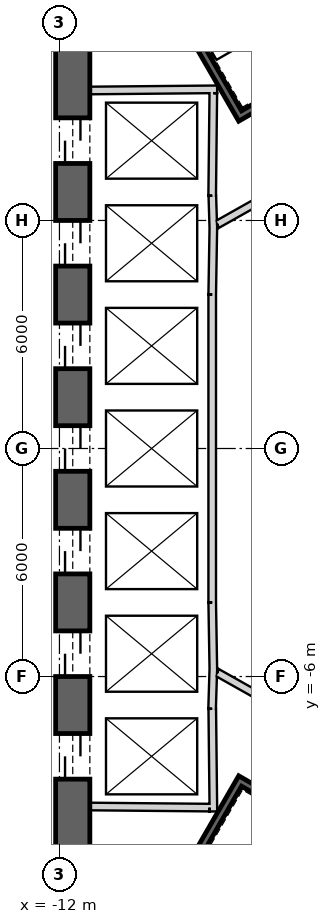
"""IFC4 building model, lengths in metres.
Left out: names, types, materials, properties, quantities, classifications, styles, units other than length and angle.
Written with IfcOpenShell. Run it as: python <this file> out.ifc"""

import sys

from ifc_helpers import new_model, si_unit, direction, frame, frame_2d, origin, place, context, subcontext, project, spatial, rectangle, extrude, element, fill, save


model = new_model("IFC4")
c1 = context("Model", 3, precision=1e-05, world=origin(), true_north=direction((0.0, 1.0)))
c2 = subcontext(c1, "Body", "Model", "MODEL_VIEW")
j1 = project(units=[si_unit("LENGTHUNIT", "METRE"), si_unit("PLANEANGLEUNIT", "RADIAN")], contexts=[c1])
p1 = place(None, origin())
s1 = spatial("IfcSite", under=j1, at=p1, CompositionType="ELEMENT")
p2 = place(p1, origin())
s2 = spatial("IfcBuilding", under=s1, at=p2, CompositionType="ELEMENT")
p3 = place(p2, frame((0.0, 0.0, 368.9)))
s3 = spatial("IfcBuildingStorey", under=s2, at=p3, CompositionType="ELEMENT", Elevation=368.9)
p4 = place(p3, frame((19.475, 2.208, 0.0), z_axis=(0.0, 0.0, 1.0), x_axis=(-0.866028369851, 0.499994862586, 0.0)))
e1 = element("IfcWall", 1, at=p4, inside=s3, PredefinedType="SHEAR", context=c2, shape_type="SweptSolid", body=[
    extrude(rectangle(XDim=31.523, YDim=0.9, at=frame_2d((15.762, 0.0))), origin(), (0.0, 0.0, 1.0), 3.9),
])
p5 = place(p4, frame((7.062, 0.0, 0.0)))
e2 = element("IfcOpeningElement", 2, at=p5, cuts=e1, PredefinedType="OPENING", context=c2, shape_type="SweptSolid", body=[
    extrude(rectangle(XDim=1.2, YDim=2.4, at=frame_2d((0.6, 1.2))), frame((0.0, 0.46, 0.0), z_axis=(0.0, -1.0, 0.0), x_axis=(1.0, 0.0, 0.0)), (0.0, 0.0, 1.0), 0.92),
])
p6 = place(p4, frame((3.612, 0.0, 0.0)))
e3 = element("IfcOpeningElement", 3, at=p6, cuts=e1, PredefinedType="OPENING", context=c2, shape_type="SweptSolid", body=[
    extrude(rectangle(XDim=1.2, YDim=2.4, at=frame_2d((0.6, 1.2))), frame((0.0, 0.46, 0.0), z_axis=(0.0, -1.0, 0.0), x_axis=(1.0, 0.0, 0.0)), (0.0, 0.0, 1.0), 0.92),
])
p7 = place(p4, frame((26.712, 0.0, 0.0)))
e4 = element("IfcOpeningElement", 4, at=p7, cuts=e1, PredefinedType="OPENING", context=c2, shape_type="SweptSolid", body=[
    extrude(rectangle(XDim=1.2, YDim=2.4, at=frame_2d((0.6, 1.2))), frame((0.0, 0.46, 0.0), z_axis=(0.0, -1.0, 0.0), x_axis=(1.0, 0.0, 0.0)), (0.0, 0.0, 1.0), 0.92),
])
p8 = place(p3, frame((-11.65, 15.762, 0.0), z_axis=(0.0, 0.0, 1.0), x_axis=(0.0, -1.0, 0.0)))
e5 = element("IfcWall", 5, at=p8, inside=s3, PredefinedType="SHEAR", context=c2, shape_type="SweptSolid", body=[
    extrude(rectangle(XDim=31.523, YDim=0.9, at=frame_2d((15.762, 0.0))), origin(), (0.0, 0.0, 1.0), 3.9),
])
p9 = place(p8, frame((7.062, 0.0, 0.0)))
e6 = element("IfcOpeningElement", 6, at=p9, cuts=e5, PredefinedType="OPENING", context=c2, shape_type="SweptSolid", body=[
    extrude(rectangle(XDim=1.2, YDim=2.4, at=frame_2d((0.6, 1.2))), frame((0.0, 0.46, 0.0), z_axis=(0.0, -1.0, 0.0), x_axis=(1.0, 0.0, 0.0)), (0.0, 0.0, 1.0), 0.92),
])
p10 = place(p8, frame((9.762, 0.0, 0.0)))
e7 = element("IfcOpeningElement", 7, at=p10, cuts=e5, PredefinedType="OPENING", context=c2, shape_type="SweptSolid", body=[
    extrude(rectangle(XDim=1.2, YDim=2.4, at=frame_2d((0.6, 1.2))), frame((0.0, 0.46, 0.0), z_axis=(0.0, -1.0, 0.0), x_axis=(1.0, 0.0, 0.0)), (0.0, 0.0, 1.0), 0.92),
])
p11 = place(p8, frame((12.462, 0.0, 0.0)))
e8 = element("IfcOpeningElement", 8, at=p11, cuts=e5, PredefinedType="OPENING", context=c2, shape_type="SweptSolid", body=[
    extrude(rectangle(XDim=1.2, YDim=2.4, at=frame_2d((0.6, 1.2))), frame((0.0, 0.46, 0.0), z_axis=(0.0, -1.0, 0.0), x_axis=(1.0, 0.0, 0.0)), (0.0, 0.0, 1.0), 0.92),
])
p12 = place(p8, frame((15.162, 0.0, 0.0)))
e9 = element("IfcOpeningElement", 9, at=p12, cuts=e5, PredefinedType="OPENING", context=c2, shape_type="SweptSolid", body=[
    extrude(rectangle(XDim=1.2, YDim=2.4, at=frame_2d((0.6, 1.2))), frame((0.0, 0.46, 0.0), z_axis=(0.0, -1.0, 0.0), x_axis=(1.0, 0.0, 0.0)), (0.0, 0.0, 1.0), 0.92),
])
p13 = place(p8, frame((17.862, 0.0, 0.0)))
e10 = element("IfcOpeningElement", 10, at=p13, cuts=e5, PredefinedType="OPENING", context=c2, shape_type="SweptSolid", body=[
    extrude(rectangle(XDim=1.2, YDim=2.4, at=frame_2d((0.6, 1.2))), frame((0.0, 0.46, 0.0), z_axis=(0.0, -1.0, 0.0), x_axis=(1.0, 0.0, 0.0)), (0.0, 0.0, 1.0), 0.92),
])
p14 = place(p8, frame((20.562, 0.0, 0.0)))
e11 = element("IfcOpeningElement", 11, at=p14, cuts=e5, PredefinedType="OPENING", context=c2, shape_type="SweptSolid", body=[
    extrude(rectangle(XDim=1.2, YDim=2.4, at=frame_2d((0.6, 1.2))), frame((0.0, 0.46, 0.0), z_axis=(0.0, -1.0, 0.0), x_axis=(1.0, 0.0, 0.0)), (0.0, 0.0, 1.0), 0.92),
])
p15 = place(p8, frame((23.262, 0.0, 0.0)))
e12 = element("IfcOpeningElement", 12, at=p15, cuts=e5, PredefinedType="OPENING", context=c2, shape_type="SweptSolid", body=[
    extrude(rectangle(XDim=1.2, YDim=2.4, at=frame_2d((0.6, 1.2))), frame((0.0, 0.46, 0.0), z_axis=(0.0, -1.0, 0.0), x_axis=(1.0, 0.0, 0.0)), (0.0, 0.0, 1.0), 0.92),
])
p16 = place(p8, frame((3.612, 0.0, 0.0)))
e13 = element("IfcOpeningElement", 13, at=p16, cuts=e5, PredefinedType="OPENING", context=c2, shape_type="SweptSolid", body=[
    extrude(rectangle(XDim=1.2, YDim=2.4, at=frame_2d((0.6, 1.2))), frame((0.0, 0.46, 0.0), z_axis=(0.0, -1.0, 0.0), x_axis=(1.0, 0.0, 0.0)), (0.0, 0.0, 1.0), 0.92),
])
p17 = place(p8, frame((26.712, 0.0, 0.0)))
e14 = element("IfcOpeningElement", 14, at=p17, cuts=e5, PredefinedType="OPENING", context=c2, shape_type="SweptSolid", body=[
    extrude(rectangle(XDim=1.2, YDim=2.4, at=frame_2d((0.6, 1.2))), frame((0.0, 0.46, 0.0), z_axis=(0.0, -1.0, 0.0), x_axis=(1.0, 0.0, 0.0)), (0.0, 0.0, 1.0), 0.92),
])
p18 = place(p3, frame((-7.825, -17.97, 0.0), z_axis=(0.0, 0.0, 1.0), x_axis=(0.866028369851, 0.499994862586, 0.0)))
e15 = element("IfcWall", 15, at=p18, inside=s3, PredefinedType="SHEAR", context=c2, shape_type="SweptSolid", body=[
    extrude(rectangle(XDim=31.523, YDim=0.9, at=frame_2d((15.762, 0.0))), origin(), (0.0, 0.0, 1.0), 3.9),
])
p19 = place(p18, frame((17.862, 0.0, 0.0)))
e16 = element("IfcOpeningElement", 16, at=p19, cuts=e15, PredefinedType="OPENING", context=c2, shape_type="SweptSolid", body=[
    extrude(rectangle(XDim=1.2, YDim=2.4, at=frame_2d((0.6, 1.2))), frame((0.0, 0.46, 0.0), z_axis=(0.0, -1.0, 0.0), x_axis=(1.0, 0.0, 0.0)), (0.0, 0.0, 1.0), 0.92),
])
p20 = place(p18, frame((20.562, 0.0, 0.0)))
e17 = element("IfcOpeningElement", 17, at=p20, cuts=e15, PredefinedType="OPENING", context=c2, shape_type="SweptSolid", body=[
    extrude(rectangle(XDim=1.2, YDim=2.4, at=frame_2d((0.6, 1.2))), frame((0.0, 0.46, 0.0), z_axis=(0.0, -1.0, 0.0), x_axis=(1.0, 0.0, 0.0)), (0.0, 0.0, 1.0), 0.92),
])
p21 = place(p18, frame((26.712, 0.0, 0.0)))
e18 = element("IfcOpeningElement", 18, at=p21, cuts=e15, PredefinedType="OPENING", context=c2, shape_type="SweptSolid", body=[
    extrude(rectangle(XDim=1.2, YDim=2.4, at=frame_2d((0.6, 1.2))), frame((0.0, 0.46, 0.0), z_axis=(0.0, -1.0, 0.0), x_axis=(1.0, 0.0, 0.0)), (0.0, 0.0, 1.0), 0.92),
])
p22 = place(p18, frame((3.612, 0.0, 0.0)))
e19 = element("IfcOpeningElement", 19, at=p22, cuts=e15, PredefinedType="OPENING", context=c2, shape_type="SweptSolid", body=[
    extrude(rectangle(XDim=1.2, YDim=2.4, at=frame_2d((0.6, 1.2))), frame((0.0, 0.46, 0.0), z_axis=(0.0, -1.0, 0.0), x_axis=(1.0, 0.0, 0.0)), (0.0, 0.0, 1.0), 0.92),
])
p23 = place(p3, frame((-11.2, 9.42, 0.0), z_axis=(0.0, 0.0, 1.0), x_axis=(0.999957167047, 0.009255488683, 0.0)))
e20 = element("IfcWall", 20, at=p23, inside=s3, PredefinedType="PLUMBINGWALL", context=c2, shape_type="SweptSolid", body=[
    extrude(rectangle(XDim=3.35, YDim=0.2, at=frame_2d((1.675, 0.0))), origin(), (0.0, 0.0, 1.0), 3.6),
])
p24 = place(p3, frame((-7.951, 9.35, 0.0), z_axis=(0.0, 0.0, 1.0), x_axis=(-0.011120469654, -0.999938165666, 0.0)))
e21 = element("IfcWall", 21, at=p24, inside=s3, PredefinedType="PLUMBINGWALL", context=c2, shape_type="SweptSolid", body=[
    extrude(rectangle(XDim=2.7, YDim=0.2, at=frame_2d((1.35, 0.0))), origin(), (0.0, 0.0, 1.0), 3.6),
])
p25 = place(p3, frame((-7.977, 6.65, 0.0), z_axis=(0.0, 0.0, 1.0), x_axis=(0.030861509705, -0.999523670164, 0.0)))
e22 = element("IfcWall", 22, at=p25, inside=s3, PredefinedType="PLUMBINGWALL", context=c2, shape_type="SweptSolid", body=[
    extrude(rectangle(XDim=0.878, YDim=0.2, at=frame_2d((0.439, 0.0))), origin(), (0.0, 0.0, 1.0), 3.6),
])
p26 = place(p3, frame((-7.949, 5.895, 0.0), z_axis=(0.0, 0.0, 1.0), x_axis=(-0.012042535896, -0.999927486035, 0.0)))
e23 = element("IfcWall", 23, at=p26, inside=s3, PredefinedType="PLUMBINGWALL", context=c2, shape_type="SweptSolid", body=[
    extrude(rectangle(XDim=1.845, YDim=0.2, at=frame_2d((0.922, 0.0))), origin(), (0.0, 0.0, 1.0), 3.6),
])
p27 = place(p3, frame((-7.98, 4.05, 0.0), z_axis=(0.0, 0.0, 1.0), x_axis=(0.0, -1.0, 0.0)))
e24 = element("IfcWall", 24, at=p27, inside=s3, PredefinedType="PLUMBINGWALL", context=c2, shape_type="SweptSolid", body=[
    extrude(rectangle(XDim=8.1, YDim=0.2, at=frame_2d((4.05, 0.0))), origin(), (0.0, 0.0, 1.0), 3.6),
])
p28 = place(p3, frame((-7.95, -5.772, 0.0), z_axis=(0.0, 0.0, 1.0), x_axis=(-0.030803413295, -0.999525462272, 0.0)))
e25 = element("IfcWall", 25, at=p28, inside=s3, PredefinedType="PLUMBINGWALL", context=c2, shape_type="SweptSolid", body=[
    extrude(rectangle(XDim=1.078, YDim=0.2, at=frame_2d((0.539, 0.0))), origin(), (0.0, 0.0, 1.0), 3.6),
])
p29 = place(p3, frame((-7.971, -4.05, 0.0), z_axis=(0.0, 0.0, 1.0), x_axis=(0.012042535896, -0.999927486035, 0.0)))
e26 = element("IfcWall", 26, at=p29, inside=s3, PredefinedType="PLUMBINGWALL", context=c2, shape_type="SweptSolid", body=[
    extrude(rectangle(XDim=1.845, YDim=0.2, at=frame_2d((0.922, 0.0))), origin(), (0.0, 0.0, 1.0), 3.6),
])
p30 = place(p3, frame((-7.979, -6.85, 0.0), z_axis=(0.0, 0.0, 1.0), x_axis=(0.011121475088, -0.999938154483, 0.0)))
e27 = element("IfcWall", 27, at=p30, inside=s3, PredefinedType="PLUMBINGWALL", context=c2, shape_type="SweptSolid", body=[
    extrude(rectangle(XDim=2.7, YDim=0.2, at=frame_2d((1.35, 0.0))), origin(), (0.0, 0.0, 1.0), 3.6),
])
p31 = place(p3, frame((-8.05, -9.449, 0.0), z_axis=(0.0, 0.0, 1.0), x_axis=(-0.999957467379, 0.009222983926, 0.0)))
e28 = element("IfcWall", 28, at=p31, inside=s3, PredefinedType="PLUMBINGWALL", context=c2, shape_type="SweptSolid", body=[
    extrude(rectangle(XDim=3.15, YDim=0.2, at=frame_2d((1.575, 0.0))), origin(), (0.0, 0.0, 1.0), 3.6),
])
p32 = place(p3, frame((-11.245, 15.678, -0.3), z_axis=(0.0, 0.0, 1.0), x_axis=(0.499977274689, -0.866038523851, 0.0)))
e29 = element("IfcWall", 29, at=p32, inside=s3, PredefinedType="SHEAR", context=c2, shape_type="SweptSolid", body=[
    extrude(rectangle(XDim=8.1, YDim=0.2, at=frame_2d((4.05, 0.0))), origin(), (0.0, 0.0, 1.0), 3.9),
])
p33 = place(p3, frame((-7.159, 8.8, -0.3), z_axis=(0.0, 0.0, 1.0), x_axis=(0.866047807691, 0.499961193289, 0.0)))
e30 = element("IfcWall", 30, at=p33, inside=s3, PredefinedType="SHEAR", context=c2, shape_type="SweptSolid", body=[
    extrude(rectangle(XDim=3.6, YDim=0.2, at=frame_2d((1.8, 0.0))), origin(), (0.0, 0.0, 1.0), 3.9),
])
p34 = place(p33, frame((1.25, 0.0, 0.3)))
e31 = element("IfcOpeningElement", 31, at=p34, cuts=e30, PredefinedType="OPENING", context=c2, shape_type="SweptSolid", body=[
    extrude(rectangle(XDim=1.1, YDim=2.1, at=frame_2d((0.55, 1.05))), frame((0.0, 0.11, 0.0), z_axis=(0.0, -1.0, 0.0), x_axis=(1.0, 0.0, 0.0)), (0.0, 0.0, 1.0), 0.22),
])
p35 = place(p3, frame((-7.196, -8.663, -0.3), z_axis=(0.0, 0.0, 1.0), x_axis=(-0.499997992926, -0.866026562566, 0.0)))
e32 = element("IfcWall", 32, at=p35, inside=s3, PredefinedType="SHEAR", context=c2, shape_type="SweptSolid", body=[
    extrude(rectangle(XDim=7.9, YDim=0.2, at=frame_2d((3.95, 0.0))), origin(), (0.0, 0.0, 1.0), 3.9),
])
p36 = place(p3, frame((-4.041, -10.599, -0.3), z_axis=(0.0, 0.0, 1.0), x_axis=(-0.866047807691, 0.499961193289, 0.0)))
e33 = element("IfcWall", 33, at=p36, inside=s3, PredefinedType="SHEAR", context=c2, shape_type="SweptSolid", body=[
    extrude(rectangle(XDim=3.6, YDim=0.2, at=frame_2d((1.8, 0.0))), origin(), (0.0, 0.0, 1.0), 3.9),
])
p37 = place(p36, frame((1.25, 0.0, 0.3)))
e34 = element("IfcOpeningElement", 34, at=p37, cuts=e33, PredefinedType="OPENING", context=c2, shape_type="SweptSolid", body=[
    extrude(rectangle(XDim=1.1, YDim=2.1, at=frame_2d((0.55, 1.05))), frame((0.0, 0.11, 0.0), z_axis=(0.0, -1.0, 0.0), x_axis=(1.0, 0.0, 0.0)), (0.0, 0.0, 1.0), 0.22),
])
p38 = place(p3, frame((-5.6, 7.16, 0.0), z_axis=(0.0, 0.0, 1.0), x_axis=(-0.871363259478, -0.490638431059, 0.0)))
e35 = element("IfcWall", 35, at=p38, inside=s3, PredefinedType="PARTITIONING", context=c2, shape_type="SweptSolid", body=[
    extrude(rectangle(XDim=2.581, YDim=0.2, at=frame_2d((1.291, 0.0))), origin(), (0.0, 0.0, 1.0), 3.6),
])
p39 = place(p38, frame((0.791, 0.0, 0.0)))
e36 = element("IfcOpeningElement", 36, at=p39, cuts=e35, PredefinedType="OPENING", context=c2, shape_type="SweptSolid", body=[
    extrude(rectangle(XDim=1.0, YDim=2.1, at=frame_2d((0.5, 1.05))), frame((0.0, 0.11, 0.0), z_axis=(0.0, -1.0, 0.0), x_axis=(1.0, 0.0, 0.0)), (0.0, 0.0, 1.0), 0.22),
])
p40 = place(p3, frame((-7.849, -5.894, 0.0), z_axis=(0.0, 0.0, 1.0), x_axis=(0.871363259478, -0.490638431059, 0.0)))
e37 = element("IfcWall", 37, at=p40, inside=s3, PredefinedType="PARTITIONING", context=c2, shape_type="SweptSolid", body=[
    extrude(rectangle(XDim=2.581, YDim=0.2, at=frame_2d((1.291, 0.0))), origin(), (0.0, 0.0, 1.0), 3.6),
])
p41 = place(p40, frame((0.791, 0.0, 0.0)))
e38 = element("IfcOpeningElement", 38, at=p41, cuts=e37, PredefinedType="OPENING", context=c2, shape_type="SweptSolid", body=[
    extrude(rectangle(XDim=1.0, YDim=2.1, at=frame_2d((0.5, 1.05))), frame((0.0, 0.11, 0.0), z_axis=(0.0, -1.0, 0.0), x_axis=(1.0, 0.0, 0.0)), (0.0, 0.0, 1.0), 0.22),
])
p42 = place(p3, frame((-6.024, 5.183, 0.0), z_axis=(0.0, 0.0, 1.0), x_axis=(-0.860126804455, -0.510080268447, 0.0)))
e39 = element("IfcWall", 39, at=p42, inside=s3, PredefinedType="PLUMBINGWALL", context=c2, shape_type="SweptSolid", body=[
    extrude(rectangle(XDim=2.24, YDim=0.15, at=frame_2d((1.12, 0.0))), origin(), (0.0, 0.0, 1.0), 3.6),
])
p43 = place(p3, frame((-7.95, -4.041, 0.0), z_axis=(0.0, 0.0, 1.0), x_axis=(0.860090281069, -0.510141851263, 0.0)))
e40 = element("IfcWall", 40, at=p43, inside=s3, PredefinedType="PLUMBINGWALL", context=c2, shape_type="SweptSolid", body=[
    extrude(rectangle(XDim=2.089, YDim=0.15, at=frame_2d((1.045, 0.0))), origin(), (0.0, 0.0, 1.0), 3.6),
])
p44 = place(p39, origin())
e41 = element("IfcDoor", 41, at=p44, inside=s3, OperationType="SINGLE_SWING_RIGHT", PredefinedType="USERDEFINED", context=c2, shape_type="SweptSolid", body=[
    extrude(rectangle(XDim=1.0, YDim=2.1, at=frame_2d((0.5, 1.05))), frame((0.0, 0.025, 0.0), z_axis=(0.0, -1.0, 0.0), x_axis=(1.0, 0.0, 0.0)), (0.0, 0.0, 1.0), 0.05),
])
fill(e36, e41)
p45 = place(p41, origin())
e42 = element("IfcDoor", 42, at=p45, inside=s3, OperationType="SINGLE_SWING_RIGHT", PredefinedType="USERDEFINED", context=c2, shape_type="SweptSolid", body=[
    extrude(rectangle(XDim=1.0, YDim=2.1, at=frame_2d((0.5, 1.05))), frame((0.0, 0.025, 0.0), z_axis=(0.0, -1.0, 0.0), x_axis=(1.0, 0.0, 0.0)), (0.0, 0.0, 1.0), 0.05),
])
fill(e38, e42)
p46 = place(p9, origin())
e43 = element("IfcDoor", 43, at=p46, inside=s3, OperationType="SLIDING_TO_LEFT", PredefinedType="USERDEFINED", context=c2, shape_type="SweptSolid", body=[
    extrude(rectangle(XDim=1.2, YDim=2.4, at=frame_2d((0.6, 1.2))), frame((0.0, 0.025, 0.0), z_axis=(0.0, -1.0, 0.0), x_axis=(1.0, 0.0, 0.0)), (0.0, 0.0, 1.0), 0.05),
])
fill(e6, e43)
p47 = place(p10, origin())
e44 = element("IfcDoor", 44, at=p47, inside=s3, OperationType="SLIDING_TO_LEFT", PredefinedType="USERDEFINED", context=c2, shape_type="SweptSolid", body=[
    extrude(rectangle(XDim=1.2, YDim=2.4, at=frame_2d((0.6, 1.2))), frame((0.0, 0.025, 0.0), z_axis=(0.0, -1.0, 0.0), x_axis=(1.0, 0.0, 0.0)), (0.0, 0.0, 1.0), 0.05),
])
fill(e7, e44)
p48 = place(p11, origin())
e45 = element("IfcDoor", 45, at=p48, inside=s3, OperationType="SLIDING_TO_LEFT", PredefinedType="USERDEFINED", context=c2, shape_type="SweptSolid", body=[
    extrude(rectangle(XDim=1.2, YDim=2.4, at=frame_2d((0.6, 1.2))), frame((0.0, 0.025, 0.0), z_axis=(0.0, -1.0, 0.0), x_axis=(1.0, 0.0, 0.0)), (0.0, 0.0, 1.0), 0.05),
])
fill(e8, e45)
p49 = place(p12, origin())
e46 = element("IfcDoor", 46, at=p49, inside=s3, OperationType="SLIDING_TO_LEFT", PredefinedType="USERDEFINED", context=c2, shape_type="SweptSolid", body=[
    extrude(rectangle(XDim=1.2, YDim=2.4, at=frame_2d((0.6, 1.2))), frame((0.0, 0.025, 0.0), z_axis=(0.0, -1.0, 0.0), x_axis=(1.0, 0.0, 0.0)), (0.0, 0.0, 1.0), 0.05),
])
fill(e9, e46)
p50 = place(p13, origin())
e47 = element("IfcDoor", 47, at=p50, inside=s3, OperationType="SLIDING_TO_LEFT", PredefinedType="USERDEFINED", context=c2, shape_type="SweptSolid", body=[
    extrude(rectangle(XDim=1.2, YDim=2.4, at=frame_2d((0.6, 1.2))), frame((0.0, 0.025, 0.0), z_axis=(0.0, -1.0, 0.0), x_axis=(1.0, 0.0, 0.0)), (0.0, 0.0, 1.0), 0.05),
])
fill(e10, e47)
p51 = place(p14, origin())
e48 = element("IfcDoor", 48, at=p51, inside=s3, OperationType="SLIDING_TO_LEFT", PredefinedType="USERDEFINED", context=c2, shape_type="SweptSolid", body=[
    extrude(rectangle(XDim=1.2, YDim=2.4, at=frame_2d((0.6, 1.2))), frame((0.0, 0.025, 0.0), z_axis=(0.0, -1.0, 0.0), x_axis=(1.0, 0.0, 0.0)), (0.0, 0.0, 1.0), 0.05),
])
fill(e11, e48)
p52 = place(p15, origin())
e49 = element("IfcDoor", 49, at=p52, inside=s3, OperationType="SLIDING_TO_LEFT", PredefinedType="USERDEFINED", context=c2, shape_type="SweptSolid", body=[
    extrude(rectangle(XDim=1.2, YDim=2.4, at=frame_2d((0.6, 1.2))), frame((0.0, 0.025, 0.0), z_axis=(0.0, -1.0, 0.0), x_axis=(1.0, 0.0, 0.0)), (0.0, 0.0, 1.0), 0.05),
])
fill(e12, e49)
save(model, sys.argv[1])
